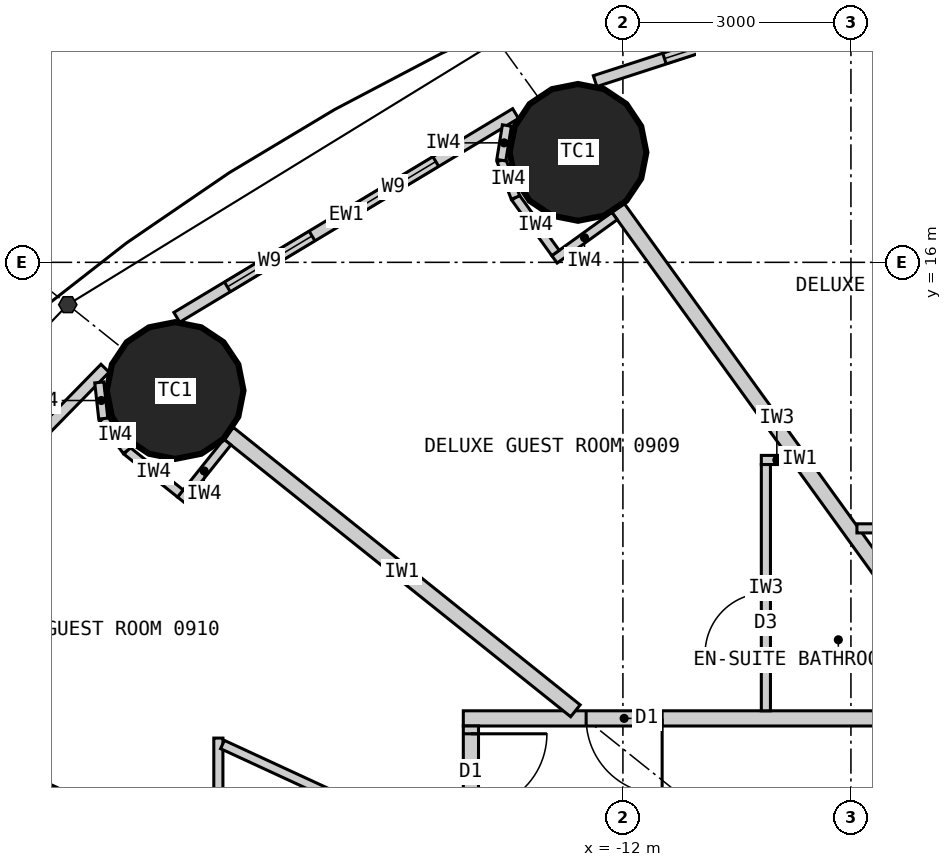
"""IFC4 building model, lengths in metres.
Left out: names, types, materials, properties, quantities, classifications, styles, units other than length and angle.
Written with IfcOpenShell. Run it as: python <this file> out.ifc"""

import sys

from ifc_helpers import new_model, si_unit, direction, frame, frame_2d, origin, origin_2d, place, context, subcontext, project, spatial, rectangle, circle, extrude, element, fill, save


model = new_model("IFC4")
c1 = context("Model", 3, precision=1e-05, world=origin(), true_north=direction((0.0, 1.0)))
c2 = subcontext(c1, "Body", "Model", "MODEL_VIEW")
j1 = project(units=[si_unit("LENGTHUNIT", "METRE"), si_unit("PLANEANGLEUNIT", "RADIAN")], contexts=[c1])
p1 = place(None, origin())
s1 = spatial("IfcSite", under=j1, at=p1, CompositionType="ELEMENT")
p2 = place(p1, origin())
s2 = spatial("IfcBuilding", under=s1, at=p2, CompositionType="ELEMENT")
p3 = place(p2, frame((0.0, 0.0, 42.6)))
s3 = spatial("IfcBuildingStorey", under=s2, at=p3, CompositionType="ELEMENT", Elevation=42.6)
for number, where, z_axis, x_axis in (
    (1, (-12.591, 17.447, 0.0), (0.0, 0.0, 1.0), (1.0, 0.0, 0.0)),
    (2, (-17.892, 14.313, 0.0), (0.0, 0.0, 1.0), (1.0, 0.0, 0.0)),
):
    element("IfcColumn", number, at=place(p3, frame(where, z_axis=z_axis, x_axis=x_axis)), inside=s3, PredefinedType="COLUMN", context=c2, shape_type="SweptSolid", body=[
        extrude(circle(Radius=0.9, at=origin_2d()), origin(), (0.0, 0.0, 1.0), 3.3),
    ])
p4 = place(p3, frame((-7.188, 20.065, 0.0), z_axis=(0.0, 0.0, 1.0), x_axis=(-0.951138486029, -0.308764603532, 0.0)))
e3 = element("IfcWall", 3, at=p4, inside=s3, PredefinedType="ELEMENTEDWALL", context=c2, shape_type="SweptSolid", body=[
    extrude(rectangle(XDim=5.444, YDim=0.15, at=frame_2d((2.722, 0.0))), origin(), (0.0, 0.0, 1.0), 3.05),
])
p5 = place(p4, frame((1.284, 0.0, 0.9)))
e4 = element("IfcOpeningElement", 4, at=p5, cuts=e3, PredefinedType="OPENING", context=c2, shape_type="SweptSolid", body=[
    extrude(rectangle(XDim=1.3, YDim=1.9, at=frame_2d((0.65, 0.95))), frame((0.0, 0.085, 0.0), z_axis=(0.0, -1.0, 0.0), x_axis=(1.0, 0.0, 0.0)), (0.0, 0.0, 1.0), 0.17),
])
p6 = place(p4, frame((3.184, 0.0, 0.9)))
e5 = element("IfcOpeningElement", 5, at=p6, cuts=e3, PredefinedType="OPENING", context=c2, shape_type="SweptSolid", body=[
    extrude(rectangle(XDim=1.3, YDim=1.9, at=frame_2d((0.65, 0.95))), frame((0.0, 0.085, 0.0), z_axis=(0.0, -1.0, 0.0), x_axis=(1.0, 0.0, 0.0)), (0.0, 0.0, 1.0), 0.17),
])
p7 = place(p3, frame((-13.412, 17.957, 0.0), z_axis=(0.0, 0.0, 1.0), x_axis=(-0.856958191554, -0.515385931054, 0.0)))
e6 = element("IfcWall", 6, at=p7, inside=s3, PredefinedType="ELEMENTEDWALL", context=c2, shape_type="SweptSolid", body=[
    extrude(rectangle(XDim=5.201, YDim=0.15, at=frame_2d((2.601, 0.0))), origin(), (0.0, 0.0, 1.0), 3.05),
])
p8 = place(p7, frame((1.225, 0.0, 0.9)))
e7 = element("IfcOpeningElement", 7, at=p8, cuts=e6, PredefinedType="OPENING", context=c2, shape_type="SweptSolid", body=[
    extrude(rectangle(XDim=1.3, YDim=1.9, at=frame_2d((0.65, 0.95))), frame((0.0, 0.085, 0.0), z_axis=(0.0, -1.0, 0.0), x_axis=(1.0, 0.0, 0.0)), (0.0, 0.0, 1.0), 0.17),
])
p9 = place(p7, frame((3.125, 0.0, 0.9)))
e8 = element("IfcOpeningElement", 8, at=p9, cuts=e6, PredefinedType="OPENING", context=c2, shape_type="SweptSolid", body=[
    extrude(rectangle(XDim=1.3, YDim=1.9, at=frame_2d((0.65, 0.95))), frame((0.0, 0.085, 0.0), z_axis=(0.0, -1.0, 0.0), x_axis=(1.0, 0.0, 0.0)), (0.0, 0.0, 1.0), 0.17),
])
p10 = place(p3, frame((-18.813, 14.607, 0.0), z_axis=(0.0, 0.0, 1.0), x_axis=(-0.699612594083, -0.714522370679, 0.0)))
e9 = element("IfcWall", 9, at=p10, inside=s3, PredefinedType="ELEMENTEDWALL", context=c2, shape_type="SweptSolid", body=[
    extrude(rectangle(XDim=4.896, YDim=0.15, at=frame_2d((2.448, 0.0))), origin(), (0.0, 0.0, 1.0), 3.05),
])
p11 = place(p10, frame((1.077, 0.0, 0.9)))
e10 = element("IfcOpeningElement", 10, at=p11, cuts=e9, PredefinedType="OPENING", context=c2, shape_type="SweptSolid", body=[
    extrude(rectangle(XDim=1.3, YDim=1.9, at=frame_2d((0.65, 0.95))), frame((0.0, 0.085, 0.0), z_axis=(0.0, -1.0, 0.0), x_axis=(1.0, 0.0, 0.0)), (0.0, 0.0, 1.0), 0.17),
])
p12 = place(p10, frame((2.977, 0.0, 0.9)))
e11 = element("IfcOpeningElement", 11, at=p12, cuts=e9, PredefinedType="OPENING", context=c2, shape_type="SweptSolid", body=[
    extrude(rectangle(XDim=1.3, YDim=1.9, at=frame_2d((0.65, 0.95))), frame((0.0, 0.085, 0.0), z_axis=(0.0, -1.0, 0.0), x_axis=(1.0, 0.0, 0.0)), (0.0, 0.0, 1.0), 0.17),
])
p13 = place(p3, frame((-14.1, 10.0, 0.0), z_axis=(0.0, 0.0, 1.0), x_axis=(1.0, 0.0, 0.0)))
e12 = element("IfcWall", 12, at=p13, inside=s3, PredefinedType="PARTITIONING", context=c2, shape_type="SweptSolid", body=[
    extrude(rectangle(XDim=28.2, YDim=0.2, at=frame_2d((14.1, 0.0))), origin(), (0.0, 0.0, 1.0), 3.05),
])
p14 = place(p13, frame((23.477, 0.0, 0.0)))
e13 = element("IfcOpeningElement", 13, at=p14, cuts=e12, PredefinedType="OPENING", context=c2, shape_type="SweptSolid", body=[
    extrude(rectangle(XDim=1.0, YDim=2.2, at=frame_2d((0.5, 1.1))), frame((0.0, 0.11, 0.0), z_axis=(0.0, -1.0, 0.0), x_axis=(1.0, 0.0, 0.0)), (0.0, 0.0, 1.0), 0.22),
])
p15 = place(p13, frame((18.529, 0.0, 0.0)))
e14 = element("IfcOpeningElement", 14, at=p15, cuts=e12, PredefinedType="OPENING", context=c2, shape_type="SweptSolid", body=[
    extrude(rectangle(XDim=1.0, YDim=2.2, at=frame_2d((0.5, 1.1))), frame((0.0, 0.11, 0.0), z_axis=(0.0, -1.0, 0.0), x_axis=(1.0, 0.0, 0.0)), (0.0, 0.0, 1.0), 0.22),
])
p16 = place(p13, frame((14.623, 0.0, 0.0)))
e15 = element("IfcOpeningElement", 15, at=p16, cuts=e12, PredefinedType="OPENING", context=c2, shape_type="SweptSolid", body=[
    extrude(rectangle(XDim=1.0, YDim=2.2, at=frame_2d((0.5, 1.1))), frame((0.0, 0.11, 0.0), z_axis=(0.0, -1.0, 0.0), x_axis=(1.0, 0.0, 0.0)), (0.0, 0.0, 1.0), 0.22),
])
p17 = place(p13, frame((11.252, 0.0, 0.0)))
e16 = element("IfcOpeningElement", 16, at=p17, cuts=e12, PredefinedType="OPENING", context=c2, shape_type="SweptSolid", body=[
    extrude(rectangle(XDim=1.0, YDim=2.1, at=frame_2d((0.5, 1.05))), frame((0.0, 0.11, 0.0), z_axis=(0.0, -1.0, 0.0), x_axis=(1.0, 0.0, 0.0)), (0.0, 0.0, 1.0), 0.22),
])
p18 = place(p13, frame((8.671, 0.0, 0.0)))
e17 = element("IfcOpeningElement", 17, at=p18, cuts=e12, PredefinedType="OPENING", context=c2, shape_type="SweptSolid", body=[
    extrude(rectangle(XDim=1.0, YDim=2.2, at=frame_2d((0.5, 1.1))), frame((0.0, 0.11, 0.0), z_axis=(0.0, -1.0, 0.0), x_axis=(1.0, 0.0, 0.0)), (0.0, 0.0, 1.0), 0.22),
])
p19 = place(p13, frame((1.616, 0.0, 0.0)))
e18 = element("IfcOpeningElement", 18, at=p19, cuts=e12, PredefinedType="OPENING", context=c2, shape_type="SweptSolid", body=[
    extrude(rectangle(XDim=1.0, YDim=2.2, at=frame_2d((0.5, 1.1))), frame((0.0, 0.11, 0.0), z_axis=(0.0, -1.0, 0.0), x_axis=(1.0, 0.0, 0.0)), (0.0, 0.0, 1.0), 0.22),
])
p20 = place(p3, frame((-14.0, 9.9, 0.0), z_axis=(0.0, 0.0, 1.0), x_axis=(0.0, -1.0, 0.0)))
e19 = element("IfcWall", 19, at=p20, inside=s3, PredefinedType="PARTITIONING", context=c2, shape_type="SweptSolid", body=[
    extrude(rectangle(XDim=19.8, YDim=0.2, at=frame_2d((9.9, 0.0))), origin(), (0.0, 0.0, 1.0), 3.05),
])
p21 = place(p20, frame((0.103, 0.0, 0.0)))
e20 = element("IfcOpeningElement", 20, at=p21, cuts=e19, PredefinedType="OPENING", context=c2, shape_type="SweptSolid", body=[
    extrude(rectangle(XDim=1.0, YDim=2.2, at=frame_2d((0.5, 1.1))), frame((0.0, 0.11, 0.0), z_axis=(0.0, -1.0, 0.0), x_axis=(1.0, 0.0, 0.0)), (0.0, 0.0, 1.0), 0.22),
])
p22 = place(p20, frame((5.252, 0.0, 0.0)))
e21 = element("IfcOpeningElement", 21, at=p22, cuts=e19, PredefinedType="OPENING", context=c2, shape_type="SweptSolid", body=[
    extrude(rectangle(XDim=1.0, YDim=2.0, at=frame_2d((0.5, 1.0))), frame((0.0, 0.11, 0.0), z_axis=(0.0, -1.0, 0.0), x_axis=(1.0, 0.0, 0.0)), (0.0, 0.0, 1.0), 0.22),
])
p23 = place(p20, frame((10.117, 0.0, 0.0)))
e22 = element("IfcOpeningElement", 22, at=p23, cuts=e19, PredefinedType="OPENING", context=c2, shape_type="SweptSolid", body=[
    extrude(rectangle(XDim=1.0, YDim=2.2, at=frame_2d((0.5, 1.1))), frame((0.0, 0.11, 0.0), z_axis=(0.0, -1.0, 0.0), x_axis=(1.0, 0.0, 0.0)), (0.0, 0.0, 1.0), 0.22),
])
p24 = place(p20, frame((13.247, 0.0, 0.0)))
e23 = element("IfcOpeningElement", 23, at=p24, cuts=e19, PredefinedType="OPENING", context=c2, shape_type="SweptSolid", body=[
    extrude(rectangle(XDim=1.0, YDim=2.0, at=frame_2d((0.5, 1.0))), frame((0.0, 0.11, 0.0), z_axis=(0.0, -1.0, 0.0), x_axis=(1.0, 0.0, 0.0)), (0.0, 0.0, 1.0), 0.22),
])
p25 = place(p20, frame((15.679, 0.0, 0.0)))
e24 = element("IfcOpeningElement", 24, at=p25, cuts=e19, PredefinedType="OPENING", context=c2, shape_type="SweptSolid", body=[
    extrude(rectangle(XDim=1.0, YDim=2.2, at=frame_2d((0.5, 1.1))), frame((0.0, 0.11, 0.0), z_axis=(0.0, -1.0, 0.0), x_axis=(1.0, 0.0, 0.0)), (0.0, 0.0, 1.0), 0.22),
])
p26 = place(p3, frame((-7.289, 10.1, 0.0), z_axis=(0.0, 0.0, 1.0), x_axis=(-0.585216319319, 0.810877216108, 0.0)))
e25 = element("IfcWall", 25, at=p26, inside=s3, PredefinedType="PARTITIONING", context=c2, shape_type="SweptSolid", body=[
    extrude(rectangle(XDim=8.16, YDim=0.2, at=frame_2d((4.08, 0.0))), origin(), (0.0, 0.0, 1.0), 2.15),
])
p27 = place(p3, frame((-12.625, 10.1, 0.0), z_axis=(0.0, 0.0, 1.0), x_axis=(-0.780872884676, 0.624689953479, 0.0)))
e26 = element("IfcWall", 26, at=p27, inside=s3, PredefinedType="PARTITIONING", context=c2, shape_type="SweptSolid", body=[
    extrude(rectangle(XDim=5.845, YDim=0.2, at=frame_2d((2.922, 0.0))), origin(), (0.0, 0.0, 1.0), 2.15),
])
p28 = place(p3, frame((-14.1, 6.512, 0.0), z_axis=(0.0, 0.0, 1.0), x_axis=(-0.907842433118, 0.41931147925, 0.0)))
e27 = element("IfcWall", 27, at=p28, inside=s3, PredefinedType="PARTITIONING", context=c2, shape_type="SweptSolid", body=[
    extrude(rectangle(XDim=7.823, YDim=0.2, at=frame_2d((3.912, 0.0))), origin(), (0.0, 0.0, 1.0), 2.15),
])
p29 = place(p3, frame((-8.921, 12.5, 0.0), z_axis=(0.0, 0.0, 1.0), x_axis=(1.0, 0.0, 0.0)))
e28 = element("IfcWall", 28, at=p29, inside=s3, PredefinedType="PARTITIONING", context=c2, shape_type="SweptSolid", body=[
    extrude(rectangle(XDim=3.372, YDim=0.12, at=frame_2d((1.686, 0.0))), origin(), (0.0, 0.0, 1.0), 3.05),
])
p30 = place(p3, frame((-9.771, 13.4, 0.0), z_axis=(0.0, 0.0, 1.0), x_axis=(-1.0, 0.0, 0.0)))
e29 = element("IfcWall", 29, at=p30, inside=s3, PredefinedType="PARTITIONING", context=c2, shape_type="SweptSolid", body=[
    extrude(rectangle(XDim=0.408, YDim=0.12, at=frame_2d((0.204, 0.0))), origin(), (0.0, 0.0, 1.0), 3.05),
])
p31 = place(p3, frame((-10.119, 10.1, 0.0), z_axis=(0.0, 0.0, 1.0), x_axis=(0.0, 1.0, 0.0)))
e30 = element("IfcWall", 30, at=p31, inside=s3, PredefinedType="PARTITIONING", context=c2, shape_type="SweptSolid", body=[
    extrude(rectangle(XDim=3.24, YDim=0.12, at=frame_2d((1.62, 0.0))), origin(), (0.0, 0.0, 1.0), 3.05),
])
p32 = place(p31, frame((0.75, 0.0, 0.0)))
e31 = element("IfcOpeningElement", 31, at=p32, cuts=e30, PredefinedType="OPENING", context=c2, shape_type="SweptSolid", body=[
    extrude(rectangle(XDim=0.8, YDim=2.1, at=frame_2d((0.4, 1.05))), frame((0.0, 0.07, 0.0), z_axis=(0.0, -1.0, 0.0), x_axis=(1.0, 0.0, 0.0)), (0.0, 0.0, 1.0), 0.14),
])
p33 = place(p3, frame((-17.323, 8.101, 0.0), z_axis=(0.0, 0.0, 1.0), x_axis=(0.0, 1.0, 0.0)))
e32 = element("IfcWall", 32, at=p33, inside=s3, PredefinedType="PARTITIONING", context=c2, shape_type="SweptSolid", body=[
    extrude(rectangle(XDim=1.64, YDim=0.12, at=frame_2d((0.82, 0.0))), origin(), (0.0, 0.0, 1.0), 3.05),
])
p34 = place(p3, frame((-14.1, 8.193, 0.0), z_axis=(0.0, 0.0, 1.0), x_axis=(-0.907836493557, 0.419324338628, 0.0)))
e33 = element("IfcWall", 33, at=p34, inside=s3, PredefinedType="PARTITIONING", context=c2, shape_type="SweptSolid", body=[
    extrude(rectangle(XDim=3.49, YDim=0.12, at=frame_2d((1.745, 0.0))), origin(), (0.0, 0.0, 1.0), 3.05),
])
p35 = place(p34, frame((0.75, 0.0, 0.0)))
e34 = element("IfcOpeningElement", 34, at=p35, cuts=e33, PredefinedType="OPENING", context=c2, shape_type="SweptSolid", body=[
    extrude(rectangle(XDim=0.8, YDim=2.1, at=frame_2d((0.4, 1.05))), frame((0.0, 0.07, 0.0), z_axis=(0.0, -1.0, 0.0), x_axis=(1.0, 0.0, 0.0)), (0.0, 0.0, 1.0), 0.14),
])
p36 = place(p3, frame((-12.11, 16.609, 0.0), z_axis=(0.0, 0.0, 1.0), x_axis=(-0.810897160646, -0.585188683123, 0.0)))
e35 = element("IfcWall", 35, at=p36, inside=s3, PredefinedType="PARTITIONING", context=c2, shape_type="SweptSolid", body=[
    extrude(rectangle(XDim=0.975, YDim=0.12, at=frame_2d((0.487, 0.0))), origin(), (0.0, 0.0, 1.0), 3.05),
])
p37 = place(p3, frame((-12.887, 16.123, 0.0), z_axis=(0.0, 0.0, 1.0), x_axis=(-0.585054732094, 0.810993810367, 0.0)))
e36 = element("IfcWall", 36, at=p37, inside=s3, PredefinedType="PARTITIONING", context=c2, shape_type="SweptSolid", body=[
    extrude(rectangle(XDim=0.9, YDim=0.12, at=frame_2d((0.45, 0.0))), origin(), (0.0, 0.0, 1.0), 3.05),
])
p38 = place(p3, frame((-13.414, 16.853, 0.0), z_axis=(0.0, 0.0, 1.0), x_axis=(-0.355705277023, 0.934598178844, 0.0)))
e37 = element("IfcWall", 37, at=p38, inside=s3, PredefinedType="PARTITIONING", context=c2, shape_type="SweptSolid", body=[
    extrude(rectangle(XDim=0.525, YDim=0.12, at=frame_2d((0.263, 0.0))), origin(), (0.0, 0.0, 1.0), 3.05),
])
p39 = place(p3, frame((-13.6, 17.344, 0.0), z_axis=(0.0, 0.0, 1.0), x_axis=(0.15994604532, 0.987125758243, 0.0)))
e38 = element("IfcWall", 38, at=p39, inside=s3, PredefinedType="PARTITIONING", context=c2, shape_type="SweptSolid", body=[
    extrude(rectangle(XDim=0.462, YDim=0.12, at=frame_2d((0.231, 0.0))), origin(), (0.0, 0.0, 1.0), 3.05),
])
p40 = place(p3, frame((-17.205, 13.635, 0.0), z_axis=(0.0, 0.0, 1.0), x_axis=(-0.624756144097, -0.780819928289, 0.0)))
e39 = element("IfcWall", 39, at=p40, inside=s3, PredefinedType="PARTITIONING", context=c2, shape_type="SweptSolid", body=[
    extrude(rectangle(XDim=0.975, YDim=0.12, at=frame_2d((0.487, 0.0))), origin(), (0.0, 0.0, 1.0), 3.05),
])
p41 = place(p3, frame((-17.823, 12.959, 0.0), z_axis=(0.0, 0.0, 1.0), x_axis=(-0.780895271023, 0.624661969144, 0.0)))
e40 = element("IfcWall", 40, at=p41, inside=s3, PredefinedType="PARTITIONING", context=c2, shape_type="SweptSolid", body=[
    extrude(rectangle(XDim=0.9, YDim=0.12, at=frame_2d((0.45, 0.0))), origin(), (0.0, 0.0, 1.0), 3.05),
])
p42 = place(p3, frame((-18.526, 13.521, 0.0), z_axis=(0.0, 0.0, 1.0), x_axis=(-0.592532503205, 0.805546542818, 0.0)))
e41 = element("IfcWall", 41, at=p42, inside=s3, PredefinedType="PARTITIONING", context=c2, shape_type="SweptSolid", body=[
    extrude(rectangle(XDim=0.525, YDim=0.12, at=frame_2d((0.262, 0.0))), origin(), (0.0, 0.0, 1.0), 3.05),
])
p43 = place(p3, frame((-18.837, 13.944, 0.0), z_axis=(0.0, 0.0, 1.0), x_axis=(-0.110543348478, 0.993871303594, 0.0)))
e42 = element("IfcWall", 42, at=p43, inside=s3, PredefinedType="PARTITIONING", context=c2, shape_type="SweptSolid", body=[
    extrude(rectangle(XDim=0.479, YDim=0.12, at=frame_2d((0.24, 0.0))), origin(), (0.0, 0.0, 1.0), 3.05),
])
p44 = place(p6, origin())
e43 = element("IfcWindow", 43, at=p44, inside=s3, PartitioningType="SINGLE_PANEL", PredefinedType="WINDOW", context=c2, shape_type="SweptSolid", body=[
    extrude(rectangle(XDim=1.3, YDim=1.9, at=frame_2d((0.65, 0.95))), frame((0.0, 0.03, 0.0), z_axis=(0.0, -1.0, 0.0), x_axis=(1.0, 0.0, 0.0)), (0.0, 0.0, 1.0), 0.06),
])
fill(e5, e43)
p45 = place(p8, origin())
e44 = element("IfcWindow", 44, at=p45, inside=s3, PartitioningType="SINGLE_PANEL", PredefinedType="WINDOW", context=c2, shape_type="SweptSolid", body=[
    extrude(rectangle(XDim=1.3, YDim=1.9, at=frame_2d((0.65, 0.95))), frame((0.0, 0.03, 0.0), z_axis=(0.0, -1.0, 0.0), x_axis=(1.0, 0.0, 0.0)), (0.0, 0.0, 1.0), 0.06),
])
fill(e7, e44)
p46 = place(p9, origin())
e45 = element("IfcWindow", 45, at=p46, inside=s3, PartitioningType="SINGLE_PANEL", PredefinedType="WINDOW", context=c2, shape_type="SweptSolid", body=[
    extrude(rectangle(XDim=1.3, YDim=1.9, at=frame_2d((0.65, 0.95))), frame((0.0, 0.03, 0.0), z_axis=(0.0, -1.0, 0.0), x_axis=(1.0, 0.0, 0.0)), (0.0, 0.0, 1.0), 0.06),
])
fill(e8, e45)
p47 = place(p32, origin())
e46 = element("IfcDoor", 46, at=p47, inside=s3, OperationType="SINGLE_SWING_LEFT", PredefinedType="DOOR", context=c2, shape_type="SweptSolid", body=[
    extrude(rectangle(XDim=0.8, YDim=2.1, at=frame_2d((0.4, 1.05))), frame((0.0, 0.025, 0.0), z_axis=(0.0, -1.0, 0.0), x_axis=(1.0, 0.0, 0.0)), (0.0, 0.0, 1.0), 0.05),
])
fill(e31, e46)
p48 = place(p19, origin())
e47 = element("IfcDoor", 47, at=p48, inside=s3, OperationType="SINGLE_SWING_RIGHT", PredefinedType="DOOR", context=c2, shape_type="SweptSolid", body=[
    extrude(rectangle(XDim=1.0, YDim=2.2, at=frame_2d((0.5, 1.1))), frame((0.0, 0.025, 0.0), z_axis=(0.0, -1.0, 0.0), x_axis=(1.0, 0.0, 0.0)), (0.0, 0.0, 1.0), 0.05),
])
fill(e18, e47)
p49 = place(p21, origin())
e48 = element("IfcDoor", 48, at=p49, inside=s3, OperationType="SINGLE_SWING_LEFT", PredefinedType="DOOR", context=c2, shape_type="SweptSolid", body=[
    extrude(rectangle(XDim=1.0, YDim=2.2, at=frame_2d((0.5, 1.1))), frame((0.0, 0.025, 0.0), z_axis=(0.0, -1.0, 0.0), x_axis=(1.0, 0.0, 0.0)), (0.0, 0.0, 1.0), 0.05),
])
fill(e20, e48)
save(model, sys.argv[1])
